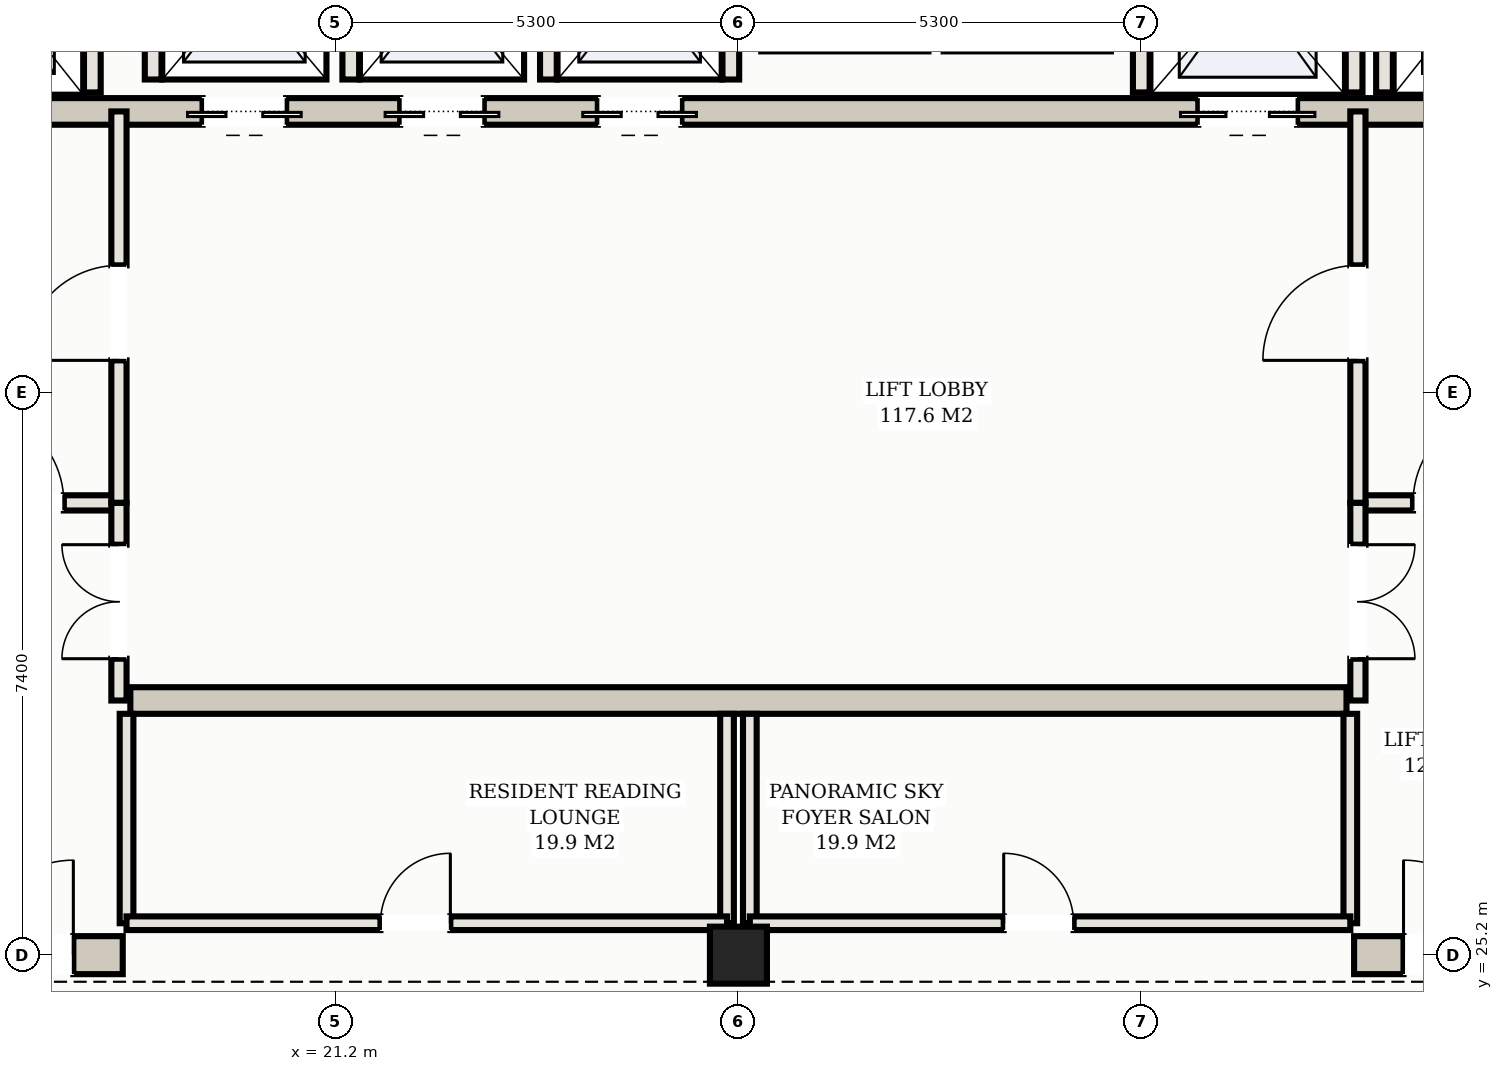
"""IFC4 building model, lengths in metres.
Left out: names, types, materials, properties, quantities, classifications, styles, units other than length and angle.
Written with IfcOpenShell. Run it as: python <this file> out.ifc"""

import sys

from ifc_helpers import new_model, si_unit, direction, frame, frame_2d, origin, origin_2d, place, context, subcontext, project, spatial, rectangle, hollow_rectangle, extrude, element, fill, save


model = new_model("IFC4")
c1 = context("Model", 3, precision=1e-05, world=origin(), true_north=direction((0.0, 1.0)))
c2 = subcontext(c1, "Body", "Model", "MODEL_VIEW")
j1 = project(units=[si_unit("LENGTHUNIT", "METRE"), si_unit("PLANEANGLEUNIT", "RADIAN")], contexts=[c1])
p1 = place(None, origin())
s1 = spatial("IfcSite", under=j1, at=p1, CompositionType="ELEMENT")
p2 = place(p1, origin())
s2 = spatial("IfcBuilding", under=s1, at=p2, CompositionType="ELEMENT")
p3 = place(p2, frame((0.0, 0.0, 223.1)))
s3 = spatial("IfcBuildingStorey", under=s2, at=p3, CompositionType="ELEMENT", Elevation=223.1)
p4 = place(p3, frame((10.35, 25.2, 0.0), z_axis=(0.0, 0.0, 1.0), x_axis=(1.0, 0.0, 0.0)))
e1 = element("IfcWall", 1, at=p4, inside=s3, PredefinedType="SHEAR", context=c2, shape_type="SweptSolid", body=[
    extrude(rectangle(XDim=8.05, YDim=0.5, at=frame_2d((4.025, 0.0))), origin(), (0.0, 0.0, 1.0), 3.11),
])
p5 = place(p4, frame((6.15, 0.0, 0.0)))
e2 = element("IfcOpeningElement", 2, at=p5, cuts=e1, PredefinedType="OPENING", context=c2, shape_type="SweptSolid", body=[
    extrude(rectangle(XDim=1.25, YDim=2.2, at=frame_2d((0.625, 1.1))), frame((0.0, 0.26, 0.0), z_axis=(0.0, -1.0, 0.0), x_axis=(1.0, 0.0, 0.0)), (0.0, 0.0, 1.0), 0.52),
])
p6 = place(p3, frame((34.6, 25.2, 0.0), z_axis=(0.0, 0.0, 1.0), x_axis=(1.0, 0.0, 0.0)))
e3 = element("IfcWall", 3, at=p6, inside=s3, PredefinedType="SHEAR", context=c2, shape_type="SweptSolid", body=[
    extrude(rectangle(XDim=8.05, YDim=0.5, at=frame_2d((4.025, 0.0))), origin(), (0.0, 0.0, 1.0), 3.11),
])
p7 = place(p6, frame((0.65, 0.0, 0.0)))
e4 = element("IfcOpeningElement", 4, at=p7, cuts=e3, PredefinedType="OPENING", context=c2, shape_type="SweptSolid", body=[
    extrude(rectangle(XDim=1.25, YDim=2.2, at=frame_2d((0.625, 1.1))), frame((0.0, 0.26, 0.0), z_axis=(0.0, -1.0, 0.0), x_axis=(1.0, 0.0, 0.0)), (0.0, 0.0, 1.0), 0.52),
])
p8 = place(p3, frame((15.5, 36.3, 0.0), z_axis=(0.0, 0.0, 1.0), x_axis=(1.0, 0.0, 0.0)))
e5 = element("IfcWall", 5, at=p8, inside=s3, PredefinedType="SHEAR", context=c2, shape_type="SweptSolid", body=[
    extrude(rectangle(XDim=22.0, YDim=0.35, at=frame_2d((11.0, 0.0))), origin(), (0.0, 0.0, 1.0), 3.11),
])
p9 = place(p8, frame((0.65, 0.0, 0.0)))
e6 = element("IfcOpeningElement", 6, at=p9, cuts=e5, PredefinedType="OPENING", context=c2, shape_type="SweptSolid", body=[
    extrude(rectangle(XDim=1.1, YDim=2.15, at=frame_2d((0.55, 1.075))), frame((0.0, 0.185, 0.0), z_axis=(0.0, -1.0, 0.0), x_axis=(1.0, 0.0, 0.0)), (0.0, 0.0, 1.0), 0.37),
])
p10 = place(p8, frame((20.25, 0.0, 0.0)))
e7 = element("IfcOpeningElement", 7, at=p10, cuts=e5, PredefinedType="OPENING", context=c2, shape_type="SweptSolid", body=[
    extrude(rectangle(XDim=1.1, YDim=2.15, at=frame_2d((0.55, 1.075))), frame((0.0, 0.185, 0.0), z_axis=(0.0, -1.0, 0.0), x_axis=(1.0, 0.0, 0.0)), (0.0, 0.0, 1.0), 0.37),
])
p11 = place(p8, frame((17.05, 0.0, 0.0)))
e8 = element("IfcOpeningElement", 8, at=p11, cuts=e5, PredefinedType="OPENING", context=c2, shape_type="SweptSolid", body=[
    extrude(rectangle(XDim=1.3, YDim=2.2, at=frame_2d((0.65, 1.1))), frame((0.0, 0.185, 0.0), z_axis=(0.0, -1.0, 0.0), x_axis=(1.0, 0.0, 0.0)), (0.0, 0.0, 1.0), 0.37),
])
p12 = place(p8, frame((3.95, 0.0, 0.0)))
e9 = element("IfcOpeningElement", 9, at=p12, cuts=e5, PredefinedType="OPENING", context=c2, shape_type="SweptSolid", body=[
    extrude(rectangle(XDim=1.1, YDim=2.15, at=frame_2d((0.55, 1.075))), frame((0.0, 0.185, 0.0), z_axis=(0.0, -1.0, 0.0), x_axis=(1.0, 0.0, 0.0)), (0.0, 0.0, 1.0), 0.37),
])
p13 = place(p8, frame((6.55, 0.0, 0.0)))
e10 = element("IfcOpeningElement", 10, at=p13, cuts=e5, PredefinedType="OPENING", context=c2, shape_type="SweptSolid", body=[
    extrude(rectangle(XDim=1.1, YDim=2.15, at=frame_2d((0.55, 1.075))), frame((0.0, 0.185, 0.0), z_axis=(0.0, -1.0, 0.0), x_axis=(1.0, 0.0, 0.0)), (0.0, 0.0, 1.0), 0.37),
])
p14 = place(p8, frame((9.15, 0.0, 0.0)))
e11 = element("IfcOpeningElement", 11, at=p14, cuts=e5, PredefinedType="OPENING", context=c2, shape_type="SweptSolid", body=[
    extrude(rectangle(XDim=1.1, YDim=2.15, at=frame_2d((0.55, 1.075))), frame((0.0, 0.185, 0.0), z_axis=(0.0, -1.0, 0.0), x_axis=(1.0, 0.0, 0.0)), (0.0, 0.0, 1.0), 0.37),
])
p15 = place(p3, frame((18.5, 28.55, 0.0), z_axis=(0.0, 0.0, 1.0), x_axis=(1.0, 0.0, 0.0)))
e12 = element("IfcWall", 12, at=p15, inside=s3, PredefinedType="SHEAR", context=c2, shape_type="SweptSolid", body=[
    extrude(rectangle(XDim=16.0, YDim=0.35, at=frame_2d((8.0, 0.0))), origin(), (0.0, 0.0, 1.0), 3.11),
])
p16 = place(p3, frame((26.5, 25.2, 0.0), z_axis=(0.0, 0.0, 1.0), x_axis=(1.0, 0.0, 0.0)))
e13 = element("IfcColumn", 13, at=p16, inside=s3, PredefinedType="COLUMN", context=c2, shape_type="SweptSolid", body=[
    extrude(hollow_rectangle(XDim=0.75, YDim=0.75, WallThickness=0.025, at=origin_2d()), origin(), (0.0, 0.0, 1.0), 3.3),
])
for number, where, z_axis, x_axis in (
    (14, (18.0, 36.55, 0.0), (0.0, 0.0, 1.0), (0.0, 1.0, 0.0)),
    (15, (35.0, 36.55, 0.0), (0.0, 0.0, 1.0), (0.0, 1.0, 0.0)),
    (16, (31.8, 36.55, 0.0), (0.0, 0.0, 1.0), (0.0, 1.0, 0.0)),
    (17, (34.6, 36.55, 0.0), (0.0, 0.0, 1.0), (0.0, 1.0, 0.0)),
):
    element("IfcWall", number, at=place(p3, frame(where, z_axis=z_axis, x_axis=x_axis)), inside=s3, PredefinedType="SOLIDWALL", context=c2, shape_type="SweptSolid", body=[
        extrude(rectangle(XDim=2.93, YDim=0.22, at=frame_2d((1.465, 0.0))), origin(), (0.0, 0.0, 1.0), 3.11),
    ])
for number, where, z_axis, x_axis in (
    (18, (18.8, 36.72, 0.0), (0.0, 0.0, 1.0), (0.0, 1.0, 0.0)),
    (19, (21.4, 36.72, 0.0), (0.0, 0.0, 1.0), (0.0, 1.0, 0.0)),
    (20, (24.0, 36.72, 0.0), (0.0, 0.0, 1.0), (0.0, 1.0, 0.0)),
    (21, (26.4, 36.72, 0.0), (0.0, 0.0, 1.0), (0.0, 1.0, 0.0)),
):
    element("IfcWall", number, at=place(p3, frame(where, z_axis=z_axis, x_axis=x_axis)), inside=s3, PredefinedType="SOLIDWALL", context=c2, shape_type="SweptSolid", body=[
        extrude(rectangle(XDim=2.56, YDim=0.22, at=frame_2d((1.28, 0.0))), origin(), (0.0, 0.0, 1.0), 3.11),
    ])
p17 = place(p3, frame((15.1, 31.15, 0.0), z_axis=(0.0, 0.0, 1.0), x_axis=(1.0, 0.0, 0.0)))
e22 = element("IfcWall", 22, at=p17, inside=s3, PredefinedType="PARTITIONING", context=c2, shape_type="SweptSolid", body=[
    extrude(rectangle(XDim=3.25, YDim=0.2, at=frame_2d((1.625, 0.0))), origin(), (0.0, 0.0, 1.0), 2.43),
])
p18 = place(p17, frame((1.275, 0.0, 0.0)))
e23 = element("IfcOpeningElement", 23, at=p18, cuts=e22, PredefinedType="OPENING", context=c2, shape_type="SweptSolid", body=[
    extrude(rectangle(XDim=1.25, YDim=2.2, at=frame_2d((0.625, 1.1))), frame((0.0, 0.11, 0.0), z_axis=(0.0, -1.0, 0.0), x_axis=(1.0, 0.0, 0.0)), (0.0, 0.0, 1.0), 0.22),
])
p19 = place(p3, frame((18.35, 31.15, 0.0), z_axis=(0.0, 0.0, 1.0), x_axis=(0.0, 1.0, 0.0)))
e24 = element("IfcWall", 24, at=p19, inside=s3, PredefinedType="PARTITIONING", context=c2, shape_type="SweptSolid", body=[
    extrude(rectangle(XDim=5.15, YDim=0.2, at=frame_2d((2.575, 0.0))), origin(), (0.0, 0.0, 1.0), 2.43),
])
p20 = place(p19, frame((1.875, 0.0, 0.0)))
e25 = element("IfcOpeningElement", 25, at=p20, cuts=e24, PredefinedType="OPENING", context=c2, shape_type="SweptSolid", body=[
    extrude(rectangle(XDim=1.25, YDim=2.2, at=frame_2d((0.625, 1.1))), frame((0.0, 0.11, 0.0), z_axis=(0.0, -1.0, 0.0), x_axis=(1.0, 0.0, 0.0)), (0.0, 0.0, 1.0), 0.22),
])
p21 = place(p3, frame((34.65, 31.15, 0.0), z_axis=(0.0, 0.0, 1.0), x_axis=(1.0, 0.0, 0.0)))
e26 = element("IfcWall", 26, at=p21, inside=s3, PredefinedType="PARTITIONING", context=c2, shape_type="SweptSolid", body=[
    extrude(rectangle(XDim=3.25, YDim=0.2, at=frame_2d((1.625, 0.0))), origin(), (0.0, 0.0, 1.0), 2.43),
])
p22 = place(p21, frame((0.725, 0.0, 0.0)))
e27 = element("IfcOpeningElement", 27, at=p22, cuts=e26, PredefinedType="OPENING", context=c2, shape_type="SweptSolid", body=[
    extrude(rectangle(XDim=1.25, YDim=2.2, at=frame_2d((0.625, 1.1))), frame((0.0, 0.11, 0.0), z_axis=(0.0, -1.0, 0.0), x_axis=(1.0, 0.0, 0.0)), (0.0, 0.0, 1.0), 0.22),
])
p23 = place(p3, frame((34.65, 31.15, 0.0), z_axis=(0.0, 0.0, 1.0), x_axis=(0.0, 1.0, 0.0)))
e28 = element("IfcWall", 28, at=p23, inside=s3, PredefinedType="PARTITIONING", context=c2, shape_type="SweptSolid", body=[
    extrude(rectangle(XDim=5.15, YDim=0.2, at=frame_2d((2.575, 0.0))), origin(), (0.0, 0.0, 1.0), 2.43),
])
p24 = place(p23, frame((1.875, 0.0, 0.0)))
e29 = element("IfcOpeningElement", 29, at=p24, cuts=e28, PredefinedType="OPENING", context=c2, shape_type="SweptSolid", body=[
    extrude(rectangle(XDim=1.25, YDim=2.2, at=frame_2d((0.625, 1.1))), frame((0.0, 0.11, 0.0), z_axis=(0.0, -1.0, 0.0), x_axis=(1.0, 0.0, 0.0)), (0.0, 0.0, 1.0), 0.22),
])
p25 = place(p3, frame((18.35, 28.55, 0.0), z_axis=(0.0, 0.0, 1.0), x_axis=(0.0, 1.0, 0.0)))
e30 = element("IfcWall", 30, at=p25, inside=s3, PredefinedType="PARTITIONING", context=c2, shape_type="SweptSolid", body=[
    extrude(rectangle(XDim=2.6, YDim=0.2, at=frame_2d((1.3, 0.0))), origin(), (0.0, 0.0, 1.0), 2.43),
])
p26 = place(p25, frame((0.55, 0.0, 0.0)))
e31 = element("IfcOpeningElement", 31, at=p26, cuts=e30, PredefinedType="OPENING", context=c2, shape_type="SweptSolid", body=[
    extrude(rectangle(XDim=1.5, YDim=2.25, at=frame_2d((0.75, 1.125))), frame((0.0, 0.11, 0.0), z_axis=(0.0, -1.0, 0.0), x_axis=(1.0, 0.0, 0.0)), (0.0, 0.0, 1.0), 0.22),
])
p27 = place(p3, frame((34.65, 28.55, 0.0), z_axis=(0.0, 0.0, 1.0), x_axis=(0.0, 1.0, 0.0)))
e32 = element("IfcWall", 32, at=p27, inside=s3, PredefinedType="PARTITIONING", context=c2, shape_type="SweptSolid", body=[
    extrude(rectangle(XDim=2.6, YDim=0.2, at=frame_2d((1.3, 0.0))), origin(), (0.0, 0.0, 1.0), 2.43),
])
p28 = place(p27, frame((0.55, 0.0, 0.0)))
e33 = element("IfcOpeningElement", 33, at=p28, cuts=e32, PredefinedType="OPENING", context=c2, shape_type="SweptSolid", body=[
    extrude(rectangle(XDim=1.5, YDim=2.25, at=frame_2d((0.75, 1.125))), frame((0.0, 0.11, 0.0), z_axis=(0.0, -1.0, 0.0), x_axis=(1.0, 0.0, 0.0)), (0.0, 0.0, 1.0), 0.22),
])
for number, where, z_axis, x_axis in (
    (34, (18.45, 25.62, 0.0), (0.0, 0.0, 1.0), (0.0, 1.0, 0.0)),
    (35, (26.35, 25.62, 0.0), (0.0, 0.0, 1.0), (0.0, 1.0, 0.0)),
):
    element("IfcWall", number, at=place(p3, frame(where, z_axis=z_axis, x_axis=x_axis)), inside=s3, PredefinedType="PARTITIONING", context=c2, shape_type="SweptSolid", body=[
        extrude(rectangle(XDim=2.755, YDim=0.18, at=frame_2d((1.377, 0.0))), origin(), (0.0, 0.0, 1.0), 2.43),
    ])
p29 = place(p3, frame((18.45, 25.62, 0.0), z_axis=(0.0, 0.0, 1.0), x_axis=(1.0, 0.0, 0.0)))
e36 = element("IfcWall", 36, at=p29, inside=s3, PredefinedType="PARTITIONING", context=c2, shape_type="SweptSolid", body=[
    extrude(rectangle(XDim=7.9, YDim=0.18, at=frame_2d((3.95, 0.0))), origin(), (0.0, 0.0, 1.0), 2.43),
])
p30 = place(p29, frame((3.34, 0.0, 0.0)))
e37 = element("IfcOpeningElement", 37, at=p30, cuts=e36, PredefinedType="OPENING", context=c2, shape_type="SweptSolid", body=[
    extrude(rectangle(XDim=0.92, YDim=2.15, at=frame_2d((0.46, 1.075))), frame((0.0, 0.1, 0.0), z_axis=(0.0, -1.0, 0.0), x_axis=(1.0, 0.0, 0.0)), (0.0, 0.0, 1.0), 0.2),
])
for number, where, z_axis, x_axis in (
    (38, (26.65, 25.62, 0.0), (0.0, 0.0, 1.0), (0.0, 1.0, 0.0)),
    (39, (34.55, 25.62, 0.0), (0.0, 0.0, 1.0), (0.0, 1.0, 0.0)),
):
    element("IfcWall", number, at=place(p3, frame(where, z_axis=z_axis, x_axis=x_axis)), inside=s3, PredefinedType="PARTITIONING", context=c2, shape_type="SweptSolid", body=[
        extrude(rectangle(XDim=2.755, YDim=0.18, at=frame_2d((1.377, 0.0))), origin(), (0.0, 0.0, 1.0), 2.43),
    ])
p31 = place(p3, frame((26.65, 25.62, 0.0), z_axis=(0.0, 0.0, 1.0), x_axis=(1.0, 0.0, 0.0)))
e40 = element("IfcWall", 40, at=p31, inside=s3, PredefinedType="PARTITIONING", context=c2, shape_type="SweptSolid", body=[
    extrude(rectangle(XDim=7.9, YDim=0.18, at=frame_2d((3.95, 0.0))), origin(), (0.0, 0.0, 1.0), 2.43),
])
p32 = place(p31, frame((3.34, 0.0, 0.0)))
e41 = element("IfcOpeningElement", 41, at=p32, cuts=e40, PredefinedType="OPENING", context=c2, shape_type="SweptSolid", body=[
    extrude(rectangle(XDim=0.92, YDim=2.15, at=frame_2d((0.46, 1.075))), frame((0.0, 0.1, 0.0), z_axis=(0.0, -1.0, 0.0), x_axis=(1.0, 0.0, 0.0)), (0.0, 0.0, 1.0), 0.2),
])
p33 = place(p11, frame((1.3, 0.0, 0.0), z_axis=(0.0, 0.0, 1.0), x_axis=(-1.0, 0.0, 0.0)))
e42 = element("IfcDoor", 42, at=p33, inside=s3, OperationType="DOUBLE_DOOR_SLIDING", PredefinedType="DOOR", context=c2, shape_type="SweptSolid", body=[
    extrude(rectangle(XDim=1.3, YDim=2.2, at=frame_2d((0.65, 1.1))), frame((0.0, 0.025, 0.0), z_axis=(0.0, -1.0, 0.0), x_axis=(1.0, 0.0, 0.0)), (0.0, 0.0, 1.0), 0.05),
])
fill(e8, e42)
p34 = place(p12, frame((1.1, 0.0, 0.0), z_axis=(0.0, 0.0, 1.0), x_axis=(-1.0, 0.0, 0.0)))
e43 = element("IfcDoor", 43, at=p34, inside=s3, OperationType="DOUBLE_DOOR_SLIDING", PredefinedType="DOOR", context=c2, shape_type="SweptSolid", body=[
    extrude(rectangle(XDim=1.1, YDim=2.15, at=frame_2d((0.55, 1.075))), frame((0.0, 0.025, 0.0), z_axis=(0.0, -1.0, 0.0), x_axis=(1.0, 0.0, 0.0)), (0.0, 0.0, 1.0), 0.05),
])
fill(e9, e43)
p35 = place(p13, frame((1.1, 0.0, 0.0), z_axis=(0.0, 0.0, 1.0), x_axis=(-1.0, 0.0, 0.0)))
e44 = element("IfcDoor", 44, at=p35, inside=s3, OperationType="DOUBLE_DOOR_SLIDING", PredefinedType="DOOR", context=c2, shape_type="SweptSolid", body=[
    extrude(rectangle(XDim=1.1, YDim=2.15, at=frame_2d((0.55, 1.075))), frame((0.0, 0.025, 0.0), z_axis=(0.0, -1.0, 0.0), x_axis=(1.0, 0.0, 0.0)), (0.0, 0.0, 1.0), 0.05),
])
fill(e10, e44)
p36 = place(p14, frame((1.1, 0.0, 0.0), z_axis=(0.0, 0.0, 1.0), x_axis=(-1.0, 0.0, 0.0)))
e45 = element("IfcDoor", 45, at=p36, inside=s3, OperationType="DOUBLE_DOOR_SLIDING", PredefinedType="DOOR", context=c2, shape_type="SweptSolid", body=[
    extrude(rectangle(XDim=1.1, YDim=2.15, at=frame_2d((0.55, 1.075))), frame((0.0, 0.025, 0.0), z_axis=(0.0, -1.0, 0.0), x_axis=(1.0, 0.0, 0.0)), (0.0, 0.0, 1.0), 0.05),
])
fill(e11, e45)
p37 = place(p5, origin())
e46 = element("IfcDoor", 46, at=p37, inside=s3, OperationType="SINGLE_SWING_RIGHT", PredefinedType="DOOR", context=c2, shape_type="SweptSolid", body=[
    extrude(rectangle(XDim=1.25, YDim=2.2, at=frame_2d((0.625, 1.1))), frame((0.0, 0.025, 0.0), z_axis=(0.0, -1.0, 0.0), x_axis=(1.0, 0.0, 0.0)), (0.0, 0.0, 1.0), 0.05),
])
fill(e2, e46)
p38 = place(p7, origin())
e47 = element("IfcDoor", 47, at=p38, inside=s3, OperationType="SINGLE_SWING_LEFT", PredefinedType="DOOR", context=c2, shape_type="SweptSolid", body=[
    extrude(rectangle(XDim=1.25, YDim=2.2, at=frame_2d((0.625, 1.1))), frame((0.0, 0.025, 0.0), z_axis=(0.0, -1.0, 0.0), x_axis=(1.0, 0.0, 0.0)), (0.0, 0.0, 1.0), 0.05),
])
fill(e4, e47)
p39 = place(p18, origin())
e48 = element("IfcDoor", 48, at=p39, inside=s3, OperationType="SINGLE_SWING_LEFT", PredefinedType="DOOR", context=c2, shape_type="SweptSolid", body=[
    extrude(rectangle(XDim=1.25, YDim=2.2, at=frame_2d((0.625, 1.1))), frame((0.0, 0.025, 0.0), z_axis=(0.0, -1.0, 0.0), x_axis=(1.0, 0.0, 0.0)), (0.0, 0.0, 1.0), 0.05),
])
fill(e23, e48)
p40 = place(p20, origin())
e49 = element("IfcDoor", 49, at=p40, inside=s3, OperationType="SINGLE_SWING_LEFT", PredefinedType="DOOR", context=c2, shape_type="SweptSolid", body=[
    extrude(rectangle(XDim=1.25, YDim=2.2, at=frame_2d((0.625, 1.1))), frame((0.0, 0.025, 0.0), z_axis=(0.0, -1.0, 0.0), x_axis=(1.0, 0.0, 0.0)), (0.0, 0.0, 1.0), 0.05),
])
fill(e25, e49)
p41 = place(p22, origin())
e50 = element("IfcDoor", 50, at=p41, inside=s3, OperationType="SINGLE_SWING_RIGHT", PredefinedType="DOOR", context=c2, shape_type="SweptSolid", body=[
    extrude(rectangle(XDim=1.25, YDim=2.2, at=frame_2d((0.625, 1.1))), frame((0.0, 0.025, 0.0), z_axis=(0.0, -1.0, 0.0), x_axis=(1.0, 0.0, 0.0)), (0.0, 0.0, 1.0), 0.05),
])
fill(e27, e50)
p42 = place(p24, origin())
e51 = element("IfcDoor", 51, at=p42, inside=s3, OperationType="SINGLE_SWING_LEFT", PredefinedType="DOOR", context=c2, shape_type="SweptSolid", body=[
    extrude(rectangle(XDim=1.25, YDim=2.2, at=frame_2d((0.625, 1.1))), frame((0.0, 0.025, 0.0), z_axis=(0.0, -1.0, 0.0), x_axis=(1.0, 0.0, 0.0)), (0.0, 0.0, 1.0), 0.05),
])
fill(e29, e51)
p43 = place(p26, origin())
e52 = element("IfcDoor", 52, at=p43, inside=s3, OperationType="DOUBLE_DOOR_SINGLE_SWING", PredefinedType="DOOR", context=c2, shape_type="SweptSolid", body=[
    extrude(rectangle(XDim=1.5, YDim=2.25, at=frame_2d((0.75, 1.125))), frame((0.0, 0.025, 0.0), z_axis=(0.0, -1.0, 0.0), x_axis=(1.0, 0.0, 0.0)), (0.0, 0.0, 1.0), 0.05),
])
fill(e31, e52)
p44 = place(p28, frame((1.5, 0.0, 0.0), z_axis=(0.0, 0.0, 1.0), x_axis=(-1.0, 0.0, 0.0)))
e53 = element("IfcDoor", 53, at=p44, inside=s3, OperationType="DOUBLE_DOOR_SINGLE_SWING", PredefinedType="DOOR", context=c2, shape_type="SweptSolid", body=[
    extrude(rectangle(XDim=1.5, YDim=2.25, at=frame_2d((0.75, 1.125))), frame((0.0, 0.025, 0.0), z_axis=(0.0, -1.0, 0.0), x_axis=(1.0, 0.0, 0.0)), (0.0, 0.0, 1.0), 0.05),
])
fill(e33, e53)
p45 = place(p30, origin())
e54 = element("IfcDoor", 54, at=p45, inside=s3, OperationType="SINGLE_SWING_RIGHT", PredefinedType="DOOR", context=c2, shape_type="SweptSolid", body=[
    extrude(rectangle(XDim=0.92, YDim=2.15, at=frame_2d((0.46, 1.075))), frame((0.0, 0.025, 0.0), z_axis=(0.0, -1.0, 0.0), x_axis=(1.0, 0.0, 0.0)), (0.0, 0.0, 1.0), 0.05),
])
fill(e37, e54)
p46 = place(p32, origin())
e55 = element("IfcDoor", 55, at=p46, inside=s3, OperationType="SINGLE_SWING_LEFT", PredefinedType="DOOR", context=c2, shape_type="SweptSolid", body=[
    extrude(rectangle(XDim=0.92, YDim=2.15, at=frame_2d((0.46, 1.075))), frame((0.0, 0.025, 0.0), z_axis=(0.0, -1.0, 0.0), x_axis=(1.0, 0.0, 0.0)), (0.0, 0.0, 1.0), 0.05),
])
fill(e41, e55)
save(model, sys.argv[1])
